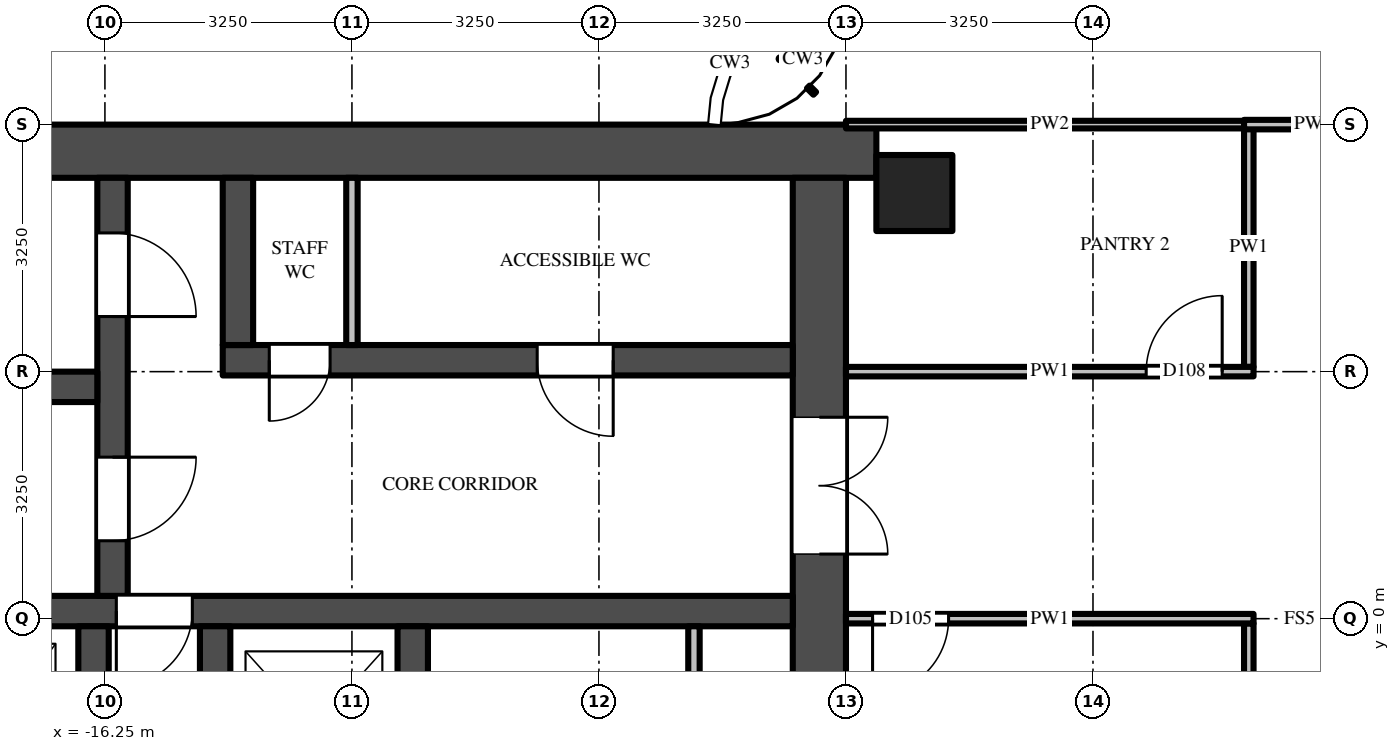
"""IFC4 building model, lengths in metres.
Left out: names, types, materials, properties, quantities, classifications, styles, units other than length and angle.
Written with IfcOpenShell. Run it as: python <this file> out.ifc"""

import sys

from ifc_helpers import new_model, si_unit, direction, frame, frame_2d, origin, origin_2d, place, context, subcontext, project, spatial, rectangle, extrude, source, transform, mapped, element, fill, save


model = new_model("IFC4")
c1 = context("Model", 3, precision=1e-05, world=origin(), true_north=direction((0.0, 1.0)))
c2 = subcontext(c1, "Body", "Model", "MODEL_VIEW")
j1 = project(units=[si_unit("LENGTHUNIT", "METRE"), si_unit("PLANEANGLEUNIT", "RADIAN")], contexts=[c1])
p1 = place(None, origin())
s1 = spatial("IfcSite", under=j1, at=p1, CompositionType="ELEMENT")
p2 = place(p1, origin())
s2 = spatial("IfcBuilding", under=s1, at=p2, CompositionType="ELEMENT")
p3 = place(p2, frame((0.0, 0.0, 283.3)))
s3 = spatial("IfcBuildingStorey", under=s2, at=p3, CompositionType="ELEMENT", Elevation=283.3)
m1 = source(origin(), c2, "Body", "SweptSolid", [
    extrude(rectangle(XDim=1.0, YDim=1.0, at=origin_2d()), origin(), (0.0, 0.0, 1.0), 3.9),
])
p4 = place(p3, frame((-5.6, 5.6, 0.0), z_axis=(0.0, 0.0, 1.0), x_axis=(1.0, 0.0, 0.0)))
e1 = element("IfcColumn", 1, at=p4, inside=s3, PredefinedType="COLUMN", context=c2, shape_type="MappedRepresentation", body=[
    mapped(m1, transform((0.0, 0.0, 0.0))),
])
m2 = source(origin(), c2, "Body", "SweptSolid", [
    extrude(rectangle(XDim=16.65, YDim=0.7, at=frame_2d((8.325, 0.0))), origin(), (0.0, 0.0, 1.0), 3.7),
])
p5 = place(p3, frame((-6.1, 6.15, 0.0), z_axis=(0.0, 0.0, 1.0), x_axis=(-1.0, 0.0, 0.0)))
e2 = element("IfcWall", 2, at=p5, inside=s3, PredefinedType="SHEAR", context=c2, shape_type="MappedRepresentation", body=[
    mapped(m2, transform((0.0, 0.0, 0.0))),
])
m3 = source(origin(), c2, "Body", "SweptSolid", [
    extrude(rectangle(XDim=9.05, YDim=0.7, at=frame_2d((4.525, 0.0))), origin(), (0.0, 0.0, 1.0), 3.7),
])
p6 = place(p3, frame((-6.85, 5.8, 0.0), z_axis=(0.0, 0.0, 1.0), x_axis=(0.0, -1.0, 0.0)))
e3 = element("IfcWall", 3, at=p6, inside=s3, PredefinedType="SHEAR", context=c2, shape_type="MappedRepresentation", body=[
    mapped(m3, transform((0.0, 0.0, 0.0))),
])
m4 = source(origin(), c2, "Body", "SweptSolid", [
    extrude(rectangle(XDim=1.8, YDim=2.1, at=frame_2d((0.9, 1.05))), frame((0.0, 0.36, 0.0), z_axis=(0.0, -1.0, 0.0), x_axis=(1.0, 0.0, 0.0)), (0.0, 0.0, 1.0), 0.72),
])
p7 = place(p6, frame((3.15, 0.0, 0.0)))
e4 = element("IfcOpeningElement", 4, at=p7, cuts=e3, PredefinedType="OPENING", context=c2, shape_type="MappedRepresentation", body=[
    mapped(m4, transform((0.0, 0.0, 0.0))),
])
m5 = source(origin(), c2, "Body", "SweptSolid", [
    extrude(rectangle(XDim=7.5, YDim=0.4, at=frame_2d((3.75, 0.0))), origin(), (0.0, 0.0, 1.0), 3.7),
])
p8 = place(p3, frame((-7.2, 3.4, 0.0), z_axis=(0.0, 0.0, 1.0), x_axis=(-1.0, 0.0, 0.0)))
e5 = element("IfcWall", 5, at=p8, inside=s3, PredefinedType="SHEAR", context=c2, shape_type="MappedRepresentation", body=[
    mapped(m5, transform((0.0, 0.0, 0.0))),
])
m6 = source(origin(), c2, "Body", "SweptSolid", [
    extrude(rectangle(XDim=1.0, YDim=2.1, at=frame_2d((0.5, 1.05))), frame((0.0, 0.21, 0.0), z_axis=(0.0, -1.0, 0.0), x_axis=(1.0, 0.0, 0.0)), (0.0, 0.0, 1.0), 0.42),
])
p9 = place(p8, frame((2.363, 0.0, 0.0)))
e6 = element("IfcOpeningElement", 6, at=p9, cuts=e5, PredefinedType="OPENING", context=c2, shape_type="MappedRepresentation", body=[
    mapped(m6, transform((0.0, 0.0, 0.0))),
])
m7 = source(origin(), c2, "Body", "SweptSolid", [
    extrude(rectangle(XDim=0.8, YDim=2.1, at=frame_2d((0.4, 1.05))), frame((0.0, 0.21, 0.0), z_axis=(0.0, -1.0, 0.0), x_axis=(1.0, 0.0, 0.0)), (0.0, 0.0, 1.0), 0.42),
])
p10 = place(p8, frame((6.087, 0.0, 0.0)))
e7 = element("IfcOpeningElement", 7, at=p10, cuts=e5, PredefinedType="OPENING", context=c2, shape_type="MappedRepresentation", body=[
    mapped(m7, transform((0.0, 0.0, 0.0))),
])
m8 = source(origin(), c2, "Body", "SweptSolid", [
    extrude(rectangle(XDim=14.85, YDim=0.4, at=frame_2d((7.425, 0.0))), origin(), (0.0, 0.0, 1.0), 3.7),
])
p11 = place(p3, frame((-7.2, 0.1, 0.0), z_axis=(0.0, 0.0, 1.0), x_axis=(-1.0, 0.0, 0.0)))
e8 = element("IfcWall", 8, at=p11, inside=s3, PredefinedType="SHEAR", context=c2, shape_type="MappedRepresentation", body=[
    mapped(m8, transform((0.0, 0.0, 0.0))),
])
p12 = place(p11, frame((7.9, 0.0, 0.0)))
e9 = element("IfcOpeningElement", 9, at=p12, cuts=e8, PredefinedType="OPENING", context=c2, shape_type="MappedRepresentation", body=[
    mapped(m6, transform((0.0, 0.0, 0.0))),
])
m9 = source(origin(), c2, "Body", "SweptSolid", [
    extrude(rectangle(XDim=5.5, YDim=0.4, at=frame_2d((2.75, 0.0))), origin(), (0.0, 0.0, 1.0), 3.7),
])
p13 = place(p3, frame((-16.15, 5.8, 0.0), z_axis=(0.0, 0.0, 1.0), x_axis=(0.0, -1.0, 0.0)))
e10 = element("IfcWall", 10, at=p13, inside=s3, PredefinedType="SHEAR", context=c2, shape_type="MappedRepresentation", body=[
    mapped(m9, transform((0.0, 0.0, 0.0))),
])
m10 = source(origin(), c2, "Body", "SweptSolid", [
    extrude(rectangle(XDim=1.1, YDim=2.1, at=frame_2d((0.55, 1.05))), frame((0.0, 0.21, 0.0), z_axis=(0.0, -1.0, 0.0), x_axis=(1.0, 0.0, 0.0)), (0.0, 0.0, 1.0), 0.42),
])
p14 = place(p13, frame((0.725, 0.0, 0.0)))
e11 = element("IfcOpeningElement", 11, at=p14, cuts=e10, PredefinedType="OPENING", context=c2, shape_type="MappedRepresentation", body=[
    mapped(m10, transform((0.0, 0.0, 0.0))),
])
p15 = place(p13, frame((3.675, 0.0, 0.0)))
e12 = element("IfcOpeningElement", 12, at=p15, cuts=e10, PredefinedType="OPENING", context=c2, shape_type="MappedRepresentation", body=[
    mapped(m10, transform((0.0, 0.0, 0.0))),
])
m11 = source(origin(), c2, "Body", "SweptSolid", [
    extrude(rectangle(XDim=5.7, YDim=0.4, at=frame_2d((2.85, 0.0))), origin(), (0.0, 0.0, 1.0), 3.7),
])
p16 = place(p3, frame((-16.35, 3.05, 0.0), z_axis=(0.0, 0.0, 1.0), x_axis=(-1.0, 0.0, 0.0)))
e13 = element("IfcWall", 13, at=p16, inside=s3, PredefinedType="SHEAR", context=c2, shape_type="MappedRepresentation", body=[
    mapped(m11, transform((0.0, 0.0, 0.0))),
])
m12 = source(origin(), c2, "Body", "SweptSolid", [
    extrude(rectangle(XDim=2.2, YDim=0.4, at=frame_2d((1.1, 0.0))), origin(), (0.0, 0.0, 1.0), 3.7),
])
p17 = place(p3, frame((-14.5, 5.8, 0.0), z_axis=(0.0, 0.0, 1.0), x_axis=(0.0, -1.0, 0.0)))
e14 = element("IfcWall", 14, at=p17, inside=s3, PredefinedType="SHEAR", context=c2, shape_type="MappedRepresentation", body=[
    mapped(m12, transform((0.0, 0.0, 0.0))),
])
m13 = source(origin(), c2, "Body", "SweptSolid", [
    extrude(rectangle(XDim=2.45, YDim=0.4, at=frame_2d((1.225, 0.0))), origin(), (0.0, 0.0, 1.0), 3.7),
])
for number, where, z_axis, x_axis in (
    (15, (-12.2, -0.1, 0.0), (0.0, 0.0, 1.0), (0.0, -1.0, 0.0)),
    (16, (-14.8, -0.1, 0.0), (0.0, 0.0, 1.0), (0.0, -1.0, 0.0)),
    (17, (-16.4, -0.1, 0.0), (0.0, 0.0, 1.0), (0.0, -1.0, 0.0)),
):
    element("IfcWall", number, at=place(p3, frame(where, z_axis=z_axis, x_axis=x_axis)), inside=s3, PredefinedType="SHEAR", context=c2, shape_type="MappedRepresentation", body=[
        mapped(m13, transform((0.0, 0.0, 0.0))),
    ])
m14 = source(origin(), c2, "Body", "SweptSolid", [
    extrude(rectangle(XDim=2.2, YDim=0.15, at=frame_2d((1.1, 0.0))), origin(), (0.0, 0.0, 1.0), 3.7),
])
p18 = place(p3, frame((-13.0, 5.8, 0.0), z_axis=(0.0, 0.0, 1.0), x_axis=(0.0, -1.0, 0.0)))
e18 = element("IfcWall", 18, at=p18, inside=s3, PredefinedType="PARTITIONING", context=c2, shape_type="MappedRepresentation", body=[
    mapped(m14, transform((0.0, 0.0, 0.0))),
])
m15 = source(origin(), c2, "Body", "SweptSolid", [
    extrude(rectangle(XDim=2.45, YDim=0.15, at=frame_2d((1.225, 0.0))), origin(), (0.0, 0.0, 1.0), 3.7),
])
p19 = place(p3, frame((-8.5, -0.1, 0.0), z_axis=(0.0, 0.0, 1.0), x_axis=(0.0, -1.0, 0.0)))
e19 = element("IfcWall", 19, at=p19, inside=s3, PredefinedType="PARTITIONING", context=c2, shape_type="MappedRepresentation", body=[
    mapped(m15, transform((0.0, 0.0, 0.0))),
])
m16 = source(origin(), c2, "Body", "SweptSolid", [
    extrude(rectangle(XDim=3.125, YDim=0.125, at=frame_2d((1.562, 0.0))), origin(), (0.0, 0.0, 1.0), 3.068),
])
p20 = place(p3, frame((-1.2, -0.062, 0.0), z_axis=(0.0, 0.0, 1.0), x_axis=(0.0, -1.0, 0.0)))
e20 = element("IfcWall", 20, at=p20, inside=s3, PredefinedType="PARTITIONING", context=c2, shape_type="MappedRepresentation", body=[
    mapped(m16, transform((0.0, 0.0, 0.0))),
])
m17 = source(origin(), c2, "Body", "SweptSolid", [
    extrude(rectangle(XDim=3.137, YDim=0.125, at=frame_2d((1.569, 0.0))), origin(), (0.0, 0.0, 1.0), 2.997),
])
p21 = place(p3, frame((-1.2, 6.45, 0.0), z_axis=(0.0, 0.0, 1.0), x_axis=(0.0, -1.0, 0.0)))
e21 = element("IfcWall", 21, at=p21, inside=s3, PredefinedType="PARTITIONING", context=c2, shape_type="MappedRepresentation", body=[
    mapped(m17, transform((0.0, 0.0, 0.0))),
])
m18 = source(origin(), c2, "Body", "SweptSolid", [
    extrude(rectangle(XDim=5.363, YDim=0.125, at=frame_2d((2.681, 0.0))), origin(), (0.0, 0.0, 1.0), 2.997),
])
p22 = place(p3, frame((-1.137, 0.0, 0.0), z_axis=(0.0, 0.0, 1.0), x_axis=(-1.0, 0.0, 0.0)))
e22 = element("IfcWall", 22, at=p22, inside=s3, PredefinedType="PARTITIONING", context=c2, shape_type="MappedRepresentation", body=[
    mapped(m18, transform((0.0, 0.0, 0.0))),
])
m19 = source(origin(), c2, "Body", "SweptSolid", [
    extrude(rectangle(XDim=1.0, YDim=2.1, at=frame_2d((0.5, 1.05))), frame((0.0, 0.073, 0.0), z_axis=(0.0, -1.0, 0.0), x_axis=(1.0, 0.0, 0.0)), (0.0, 0.0, 1.0), 0.145),
])
p23 = place(p22, frame((4.012, 0.0, 0.0)))
e23 = element("IfcOpeningElement", 23, at=p23, cuts=e22, PredefinedType="OPENING", context=c2, shape_type="MappedRepresentation", body=[
    mapped(m19, transform((0.0, 0.0, 0.0))),
])
p24 = place(p3, frame((-6.5, 3.25, 0.0), z_axis=(0.0, 0.0, 1.0), x_axis=(1.0, 0.0, 0.0)))
e24 = element("IfcWall", 24, at=p24, inside=s3, PredefinedType="PARTITIONING", context=c2, shape_type="MappedRepresentation", body=[
    mapped(m18, transform((0.0, 0.0, 0.0))),
])
p25 = place(p24, frame((3.95, 0.0, 0.0)))
e25 = element("IfcOpeningElement", 25, at=p25, cuts=e24, PredefinedType="OPENING", context=c2, shape_type="MappedRepresentation", body=[
    mapped(m19, transform((0.0, 0.0, 0.0))),
])
m20 = source(origin(), c2, "Body", "SweptSolid", [
    extrude(rectangle(XDim=5.363, YDim=0.1, at=frame_2d((2.681, 0.0))), origin(), (0.0, 0.0, 1.0), 2.78),
])
p26 = place(p3, frame((-6.5, 6.5, 0.0), z_axis=(0.0, 0.0, 1.0), x_axis=(1.0, 0.0, 0.0)))
e26 = element("IfcWall", 26, at=p26, inside=s3, PredefinedType="PARTITIONING", context=c2, shape_type="MappedRepresentation", body=[
    mapped(m20, transform((0.0, 0.0, 0.0))),
])
m21 = source(origin(), c2, "Body", "SweptSolid", [
    extrude(rectangle(XDim=1.825, YDim=0.125, at=frame_2d((0.913, 0.0))), origin(), (0.0, 0.0, 1.0), 3.7),
])
p27 = place(p3, frame((-1.262, 6.5, 0.0), z_axis=(0.0, 0.0, 1.0), x_axis=(1.0, 0.0, 0.0)))
e27 = element("IfcWall", 27, at=p27, inside=s3, PredefinedType="PARTITIONING", context=c2, shape_type="MappedRepresentation", body=[
    mapped(m21, transform((0.0, 0.0, 0.0))),
])
m22 = source(origin(), c2, "Body", "SweptSolid", [
    extrude(rectangle(XDim=1.8, YDim=2.1, at=frame_2d((0.9, 1.05))), frame((0.0, -0.275, 0.0), z_axis=(0.0, -1.0, 0.0), x_axis=(1.0, 0.0, 0.0)), (0.0, 0.0, 1.0), 0.05),
])
p28 = place(p7, origin())
e28 = element("IfcDoor", 28, at=p28, inside=s3, OperationType="DOUBLE_DOOR_SINGLE_SWING", PredefinedType="DOOR", context=c2, shape_type="MappedRepresentation", body=[
    mapped(m22, transform((0.0, 0.0, 0.0))),
])
fill(e4, e28)
m23 = source(origin(), c2, "Body", "SweptSolid", [
    extrude(rectangle(XDim=1.1, YDim=2.1, at=frame_2d((0.55, 1.05))), frame((0.0, 0.025, 0.0), z_axis=(0.0, -1.0, 0.0), x_axis=(1.0, 0.0, 0.0)), (0.0, 0.0, 1.0), 0.05),
])
p29 = place(p14, origin())
e29 = element("IfcDoor", 29, at=p29, inside=s3, OperationType="SINGLE_SWING_RIGHT", PredefinedType="DOOR", context=c2, shape_type="MappedRepresentation", body=[
    mapped(m23, transform((0.0, 0.0, 0.0))),
])
fill(e11, e29)
p30 = place(p15, origin())
e30 = element("IfcDoor", 30, at=p30, inside=s3, OperationType="SINGLE_SWING_LEFT", PredefinedType="DOOR", context=c2, shape_type="MappedRepresentation", body=[
    mapped(m23, transform((0.0, 0.0, 0.0))),
])
fill(e12, e30)
m24 = source(origin(), c2, "Body", "SweptSolid", [
    extrude(rectangle(XDim=1.0, YDim=2.1, at=frame_2d((0.5, 1.05))), frame((0.0, 0.025, 0.0), z_axis=(0.0, -1.0, 0.0), x_axis=(1.0, 0.0, 0.0)), (0.0, 0.0, 1.0), 0.05),
])
p31 = place(p12, origin())
e31 = element("IfcDoor", 31, at=p31, inside=s3, OperationType="SINGLE_SWING_RIGHT", PredefinedType="DOOR", context=c2, shape_type="MappedRepresentation", body=[
    mapped(m24, transform((0.0, 0.0, 0.0))),
])
fill(e9, e31)
p32 = place(p9, origin())
e32 = element("IfcDoor", 32, at=p32, inside=s3, OperationType="SINGLE_SWING_LEFT", PredefinedType="DOOR", context=c2, shape_type="MappedRepresentation", body=[
    mapped(m24, transform((0.0, 0.0, 0.0))),
])
fill(e6, e32)
m25 = source(origin(), c2, "Body", "SweptSolid", [
    extrude(rectangle(XDim=0.8, YDim=2.1, at=frame_2d((0.4, 1.05))), frame((0.0, 0.025, 0.0), z_axis=(0.0, -1.0, 0.0), x_axis=(1.0, 0.0, 0.0)), (0.0, 0.0, 1.0), 0.05),
])
p33 = place(p10, origin())
e33 = element("IfcDoor", 33, at=p33, inside=s3, OperationType="SINGLE_SWING_RIGHT", PredefinedType="DOOR", context=c2, shape_type="MappedRepresentation", body=[
    mapped(m25, transform((0.0, 0.0, 0.0))),
])
fill(e7, e33)
p34 = place(p23, origin())
e34 = element("IfcDoor", 34, at=p34, inside=s3, OperationType="SINGLE_SWING_RIGHT", PredefinedType="DOOR", context=c2, shape_type="MappedRepresentation", body=[
    mapped(m24, transform((0.0, 0.0, 0.0))),
])
fill(e23, e34)
p35 = place(p25, origin())
e35 = element("IfcDoor", 35, at=p35, inside=s3, OperationType="SINGLE_SWING_RIGHT", PredefinedType="DOOR", context=c2, shape_type="MappedRepresentation", body=[
    mapped(m24, transform((0.0, 0.0, 0.0))),
])
fill(e25, e35)
save(model, sys.argv[1])
